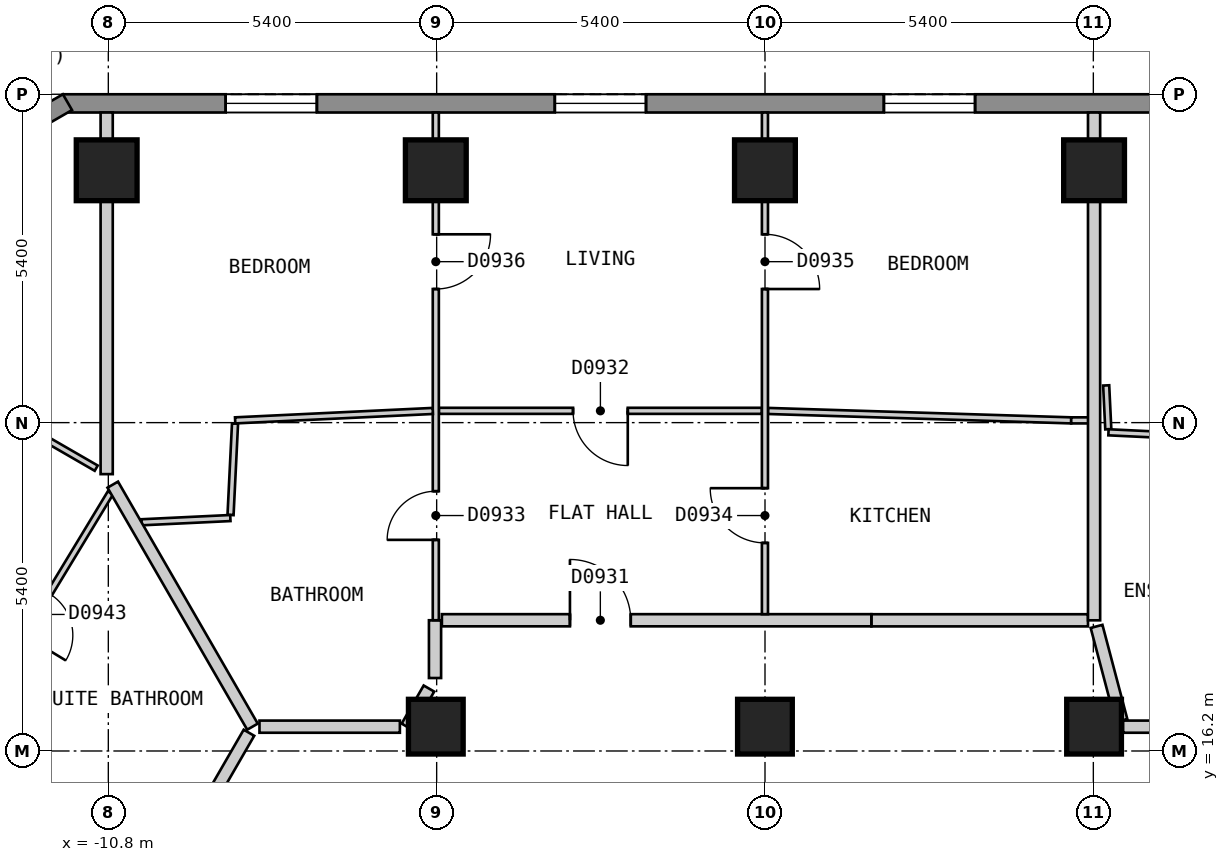
"""IFC4 building model, lengths in metres.
Left out: names, types, materials, properties, quantities, classifications, styles, units other than length and angle.
Written with IfcOpenShell. Run it as: python <this file> out.ifc"""

import sys

from ifc_helpers import new_model, si_unit, direction, frame, frame_2d, origin, origin_2d, place, context, subcontext, project, spatial, polyline, rectangle, outline, extrude, element, fill, save


model = new_model("IFC4")
c1 = context("Model", 3, precision=1e-05, world=origin(), true_north=direction((0.0, 1.0)))
c2 = subcontext(c1, "Body", "Model", "MODEL_VIEW")
j1 = project(units=[si_unit("LENGTHUNIT", "METRE"), si_unit("PLANEANGLEUNIT", "RADIAN")], contexts=[c1])
p1 = place(None, origin())
s1 = spatial("IfcSite", under=j1, at=p1, CompositionType="ELEMENT")
p2 = place(p1, origin())
s2 = spatial("IfcBuilding", under=s1, at=p2, CompositionType="ELEMENT")
p3 = place(p2, frame((0.0, 0.0, 102.0)))
s3 = spatial("IfcBuildingStorey", under=s2, at=p3, CompositionType="ELEMENT", Elevation=102.0)
for number, where, z_axis, x_axis in (
    (1, (5.412, 25.75, 0.0), (0.0, 0.0, 1.0), (-1.0, 0.0, 0.0)),
    (2, (-0.001, 25.75, 0.0), (0.0, 0.0, 1.0), (-1.0, 0.0, 0.0)),
    (3, (-5.414, 25.75, 0.0), (0.0, 0.0, 1.0), (-1.0, 0.0, 0.0)),
    (4, (-10.827, 25.75, 0.0), (0.0, 0.0, 1.0), (-1.0, 0.0, 0.0)),
):
    element("IfcColumn", number, at=place(p3, frame(where, z_axis=z_axis, x_axis=x_axis)), inside=s3, PredefinedType="COLUMN", context=c2, shape_type="SweptSolid", body=[
        extrude(rectangle(XDim=1.0, YDim=1.0, at=origin_2d()), origin(), (0.0, 0.0, 1.0), 3.0),
    ])
for number, where, z_axis, x_axis in (
    (5, (5.412, 16.6, 0.0), (0.0, 0.0, 1.0), (-1.0, 0.0, 0.0)),
    (6, (-0.001, 16.6, 0.0), (0.0, 0.0, 1.0), (-1.0, 0.0, 0.0)),
    (7, (-5.414, 16.6, 0.0), (0.0, 0.0, 1.0), (-1.0, 0.0, 0.0)),
):
    element("IfcColumn", number, at=place(p3, frame(where, z_axis=z_axis, x_axis=x_axis)), inside=s3, PredefinedType="COLUMN", context=c2, shape_type="SweptSolid", body=[
        extrude(rectangle(XDim=0.9, YDim=0.9, at=origin_2d()), origin(), (0.0, 0.0, 1.0), 3.0),
    ])
p4 = place(p3, frame((11.547, 26.85, 0.0), z_axis=(0.0, 0.0, 1.0), x_axis=(-1.0, 0.0, 0.0)))
e8 = element("IfcWall", 8, at=p4, inside=s3, PredefinedType="SOLIDWALL", context=c2, shape_type="SweptSolid", body=[
    extrude(outline(polyline([(0.0, -0.15), (23.094, -0.15), (23.014, 0.15), (0.08, 0.15), (0.0, -0.15)])), origin(), (0.0, 0.0, 1.0), 2.7),
])
p5 = place(p4, frame((2.678, 0.0, 0.15)))
e9 = element("IfcOpeningElement", 9, at=p5, cuts=e8, PredefinedType="OPENING", context=c2, shape_type="SweptSolid", body=[
    extrude(rectangle(XDim=1.5, YDim=2.1, at=frame_2d((0.75, 1.05))), frame((0.0, 0.16, 0.0), z_axis=(0.0, -1.0, 0.0), x_axis=(1.0, 0.0, 0.0)), (0.0, 0.0, 1.0), 0.32),
])
p6 = place(p4, frame((8.092, 0.0, 0.15)))
e10 = element("IfcOpeningElement", 10, at=p6, cuts=e8, PredefinedType="OPENING", context=c2, shape_type="SweptSolid", body=[
    extrude(rectangle(XDim=1.5, YDim=2.1, at=frame_2d((0.75, 1.05))), frame((0.0, 0.16, 0.0), z_axis=(0.0, -1.0, 0.0), x_axis=(1.0, 0.0, 0.0)), (0.0, 0.0, 1.0), 0.32),
])
p7 = place(p4, frame((13.504, 0.0, 0.15)))
e11 = element("IfcOpeningElement", 11, at=p7, cuts=e8, PredefinedType="OPENING", context=c2, shape_type="SweptSolid", body=[
    extrude(rectangle(XDim=1.5, YDim=2.1, at=frame_2d((0.75, 1.05))), frame((0.0, 0.16, 0.0), z_axis=(0.0, -1.0, 0.0), x_axis=(1.0, 0.0, 0.0)), (0.0, 0.0, 1.0), 0.32),
])
p8 = place(p4, frame((18.917, 0.0, 0.15)))
e12 = element("IfcOpeningElement", 12, at=p8, cuts=e8, PredefinedType="OPENING", context=c2, shape_type="SweptSolid", body=[
    extrude(rectangle(XDim=1.5, YDim=2.1, at=frame_2d((0.75, 1.05))), frame((0.0, 0.16, 0.0), z_axis=(0.0, -1.0, 0.0), x_axis=(1.0, 0.0, 0.0)), (0.0, 0.0, 1.0), 0.32),
])
p9 = place(p3, frame((-11.472, 26.87, 0.0), z_axis=(0.0, 0.0, 1.0), x_axis=(-0.866022959057, -0.500004234368, 0.0)))
e13 = element("IfcWall", 13, at=p9, inside=s3, PredefinedType="SOLIDWALL", context=c2, shape_type="SweptSolid", body=[
    extrude(outline(polyline([(0.0, -0.15), (5.0, -0.15), (4.92, 0.15), (0.08, 0.15), (0.0, -0.15)])), origin(), (0.0, 0.0, 1.0), 2.7),
])
p10 = place(p9, frame((0.65, 0.0, 0.15)))
e14 = element("IfcOpeningElement", 14, at=p10, cuts=e13, PredefinedType="OPENING", context=c2, shape_type="SweptSolid", body=[
    extrude(rectangle(XDim=1.2, YDim=2.1, at=frame_2d((0.6, 1.05))), frame((0.0, 0.16, 0.0), z_axis=(0.0, -1.0, 0.0), x_axis=(1.0, 0.0, 0.0)), (0.0, 0.0, 1.0), 0.32),
])
p11 = place(p3, frame((5.453, 18.249, 0.0), z_axis=(0.0, 0.0, 1.0), x_axis=(0.255385747764, -0.966839241983, 0.0)))
e15 = element("IfcWall", 15, at=p11, inside=s3, PredefinedType="PARTITIONING", context=c2, shape_type="SweptSolid", body=[
    extrude(rectangle(XDim=1.602, YDim=0.2, at=frame_2d((0.801, 0.0))), origin(), (0.0, 0.0, 1.0), 2.7),
])
p12 = place(p3, frame((-8.314, 16.6, 0.0), z_axis=(0.0, 0.0, 1.0), x_axis=(1.0, 0.0, 0.0)))
e16 = element("IfcWall", 16, at=p12, inside=s3, PredefinedType="PARTITIONING", context=c2, shape_type="SweptSolid", body=[
    extrude(rectangle(XDim=2.309, YDim=0.2, at=frame_2d((1.155, 0.0))), origin(), (0.0, 0.0, 1.0), 2.7),
])
p13 = place(p3, frame((5.889, 16.6, 0.0), z_axis=(0.0, 0.0, 1.0), x_axis=(1.0, 0.0, 0.0)))
e17 = element("IfcWall", 17, at=p13, inside=s3, PredefinedType="PARTITIONING", context=c2, shape_type="SweptSolid", body=[
    extrude(rectangle(XDim=2.483, YDim=0.2, at=frame_2d((1.242, 0.0))), origin(), (0.0, 0.0, 1.0), 2.7),
])
p14 = place(p3, frame((1.75, 18.349, 0.0), z_axis=(0.0, 0.0, 1.0), x_axis=(1.0, 0.0, 0.0)))
e18 = element("IfcWall", 18, at=p14, inside=s3, PredefinedType="PARTITIONING", context=c2, shape_type="SweptSolid", body=[
    extrude(rectangle(XDim=3.562, YDim=0.2, at=frame_2d((1.781, 0.0))), origin(), (0.0, 0.0, 1.0), 2.7),
])
p15 = place(p3, frame((-5.314, 18.35, 0.0), z_axis=(0.0, 0.0, 1.0), x_axis=(1.0, 0.0, 0.0)))
e19 = element("IfcWall", 19, at=p15, inside=s3, PredefinedType="PARTITIONING", context=c2, shape_type="SweptSolid", body=[
    extrude(rectangle(XDim=7.063, YDim=0.2, at=frame_2d((3.531, 0.0))), origin(), (0.0, 0.0, 1.0), 2.7),
])
p16 = place(p15, frame((2.106, 0.0, 0.0)))
e20 = element("IfcOpeningElement", 20, at=p16, cuts=e19, PredefinedType="OPENING", context=c2, shape_type="SweptSolid", body=[
    extrude(rectangle(XDim=1.0, YDim=2.1, at=frame_2d((0.5, 1.05))), frame((0.0, 0.11, 0.0), z_axis=(0.0, -1.0, 0.0), x_axis=(1.0, 0.0, 0.0)), (0.0, 0.0, 1.0), 0.22),
])
p17 = place(p3, frame((-5.889, 16.6, 0.0), z_axis=(0.0, 0.0, 1.0), x_axis=(0.499839240638, 0.866118198353, 0.0)))
e21 = element("IfcWall", 21, at=p17, inside=s3, PredefinedType="PARTITIONING", context=c2, shape_type="SweptSolid", body=[
    extrude(rectangle(XDim=0.724, YDim=0.2, at=frame_2d((0.362, 0.0))), origin(), (0.0, 0.0, 1.0), 2.7),
])
p18 = place(p3, frame((-18.562, -0.951, 0.0), z_axis=(0.0, 0.0, 1.0), x_axis=(0.499987097491, 0.866032852923, 0.0)))
e22 = element("IfcWall", 22, at=p18, inside=s3, PredefinedType="PARTITIONING", context=c2, shape_type="SweptSolid", body=[
    extrude(rectangle(XDim=20.15, YDim=0.2, at=frame_2d((10.075, 0.0))), origin(), (0.0, 0.0, 1.0), 2.7),
])
p19 = place(p18, frame((14.627, 0.0, 0.0)))
e23 = element("IfcOpeningElement", 23, at=p19, cuts=e22, PredefinedType="OPENING", context=c2, shape_type="SweptSolid", body=[
    extrude(rectangle(XDim=1.0, YDim=2.1, at=frame_2d((0.5, 1.05))), frame((0.0, 0.11, 0.0), z_axis=(0.0, -1.0, 0.0), x_axis=(1.0, 0.0, 0.0)), (0.0, 0.0, 1.0), 0.22),
])
p20 = place(p18, frame((9.604, 0.0, 0.0)))
e24 = element("IfcOpeningElement", 24, at=p20, cuts=e22, PredefinedType="OPENING", context=c2, shape_type="SweptSolid", body=[
    extrude(rectangle(XDim=1.0, YDim=2.1, at=frame_2d((0.5, 1.05))), frame((0.0, 0.11, 0.0), z_axis=(0.0, -1.0, 0.0), x_axis=(1.0, 0.0, 0.0)), (0.0, 0.0, 1.0), 0.22),
])
p21 = place(p3, frame((-5.427, 17.4, 0.0), z_axis=(0.0, 0.0, 1.0), x_axis=(0.0, 1.0, 0.0)))
e25 = element("IfcWall", 25, at=p21, inside=s3, PredefinedType="PARTITIONING", context=c2, shape_type="SweptSolid", body=[
    extrude(rectangle(XDim=0.95, YDim=0.2, at=frame_2d((0.475, 0.0))), origin(), (0.0, 0.0, 1.0), 2.7),
])
p22 = place(p3, frame((5.611, 22.212, 0.0), z_axis=(0.0, 0.0, 1.0), x_axis=(0.048368650834, -0.998829551834, 0.0)))
e26 = element("IfcWall", 26, at=p22, inside=s3, PredefinedType="PARTITIONING", context=c2, shape_type="SweptSolid", body=[
    extrude(rectangle(XDim=0.722, YDim=0.1, at=frame_2d((0.361, 0.0))), origin(), (0.0, 0.0, 1.0), 2.7),
])
p23 = place(p3, frame((0.049, 21.792, 0.0), z_axis=(0.0, 0.0, 1.0), x_axis=(0.999517123417, -0.031072817652, 0.0)))
e27 = element("IfcWall", 27, at=p23, inside=s3, PredefinedType="PARTITIONING", context=c2, shape_type="SweptSolid", body=[
    extrude(rectangle(XDim=4.989, YDim=0.1, at=frame_2d((2.495, 0.0))), origin(), (0.0, 0.0, 1.0), 2.7),
])
p24 = place(p3, frame((5.649, 21.441, 0.0), z_axis=(0.0, 0.0, 1.0), x_axis=(0.998867332207, -0.047582062273, 0.0)))
e28 = element("IfcWall", 28, at=p24, inside=s3, PredefinedType="PARTITIONING", context=c2, shape_type="SweptSolid", body=[
    extrude(rectangle(XDim=2.058, YDim=0.1, at=frame_2d((1.029, 0.0))), origin(), (0.0, 0.0, 1.0), 2.7),
])
p25 = place(p3, frame((-18.489, 19.375, 0.0), z_axis=(0.0, 0.0, 1.0), x_axis=(0.866016855193, -0.500014806302, 0.0)))
e29 = element("IfcWall", 29, at=p25, inside=s3, PredefinedType="PARTITIONING", context=c2, shape_type="SweptSolid", body=[
    extrude(rectangle(XDim=10.0, YDim=0.1, at=frame_2d((5.0, 0.0))), origin(), (0.0, 0.0, 1.0), 2.7),
])
p26 = place(p25, frame((2.577, 0.0, 0.0)))
e30 = element("IfcOpeningElement", 30, at=p26, cuts=e29, PredefinedType="OPENING", context=c2, shape_type="SweptSolid", body=[
    extrude(rectangle(XDim=0.9, YDim=2.1, at=frame_2d((0.45, 1.05))), frame((0.0, 0.06, 0.0), z_axis=(0.0, -1.0, 0.0), x_axis=(1.0, 0.0, 0.0)), (0.0, 0.0, 1.0), 0.12),
])
p27 = place(p3, frame((-15.977, 23.725, 0.0), z_axis=(0.0, 0.0, 1.0), x_axis=(0.866028566888, -0.499994521305, 0.0)))
e31 = element("IfcWall", 31, at=p27, inside=s3, PredefinedType="PARTITIONING", context=c2, shape_type="SweptSolid", body=[
    extrude(rectangle(XDim=5.748, YDim=0.1, at=frame_2d((2.874, 0.0))), origin(), (0.0, 0.0, 1.0), 2.7),
])
p28 = place(p27, frame((2.524, 0.0, 0.0)))
e32 = element("IfcOpeningElement", 32, at=p28, cuts=e31, PredefinedType="OPENING", context=c2, shape_type="SweptSolid", body=[
    extrude(rectangle(XDim=0.9, YDim=2.1, at=frame_2d((0.45, 1.05))), frame((0.0, 0.06, 0.0), z_axis=(0.0, -1.0, 0.0), x_axis=(1.0, 0.0, 0.0)), (0.0, 0.0, 1.0), 0.12),
])
p29 = place(p3, frame((5.036, 21.637, 0.0), z_axis=(0.0, 0.0, 1.0), x_axis=(1.0, 0.0, 0.0)))
e33 = element("IfcWall", 33, at=p29, inside=s3, PredefinedType="PARTITIONING", context=c2, shape_type="SweptSolid", body=[
    extrude(rectangle(XDim=0.337, YDim=0.1, at=frame_2d((0.168, 0.0))), origin(), (0.0, 0.0, 1.0), 2.7),
])
p30 = place(p3, frame((-5.364, 21.794, 0.0), z_axis=(0.0, 0.0, 1.0), x_axis=(1.0, 0.0, 0.0)))
e34 = element("IfcWall", 34, at=p30, inside=s3, PredefinedType="PARTITIONING", context=c2, shape_type="SweptSolid", body=[
    extrude(rectangle(XDim=5.313, YDim=0.1, at=frame_2d((2.656, 0.0))), origin(), (0.0, 0.0, 1.0), 2.7),
])
p31 = place(p30, frame((2.207, 0.0, 0.0)))
e35 = element("IfcOpeningElement", 35, at=p31, cuts=e34, PredefinedType="OPENING", context=c2, shape_type="SweptSolid", body=[
    extrude(rectangle(XDim=0.9, YDim=2.1, at=frame_2d((0.45, 1.05))), frame((0.0, 0.06, 0.0), z_axis=(0.0, -1.0, 0.0), x_axis=(1.0, 0.0, 0.0)), (0.0, 0.0, 1.0), 0.12),
])
p32 = place(p3, frame((-13.221, 16.391, 0.0), z_axis=(0.0, 0.0, 1.0), x_axis=(0.518164725284, 0.855280841286, 0.0)))
e36 = element("IfcWall", 36, at=p32, inside=s3, PredefinedType="PARTITIONING", context=c2, shape_type="SweptSolid", body=[
    extrude(rectangle(XDim=4.74, YDim=0.1, at=frame_2d((2.37, 0.0))), origin(), (0.0, 0.0, 1.0), 2.7),
])
p33 = place(p32, frame((2.002, 0.0, 0.0)))
e37 = element("IfcOpeningElement", 37, at=p33, cuts=e36, PredefinedType="OPENING", context=c2, shape_type="SweptSolid", body=[
    extrude(rectangle(XDim=0.8, YDim=2.1, at=frame_2d((0.4, 1.05))), frame((0.0, 0.06, 0.0), z_axis=(0.0, -1.0, 0.0), x_axis=(1.0, 0.0, 0.0)), (0.0, 0.0, 1.0), 0.12),
])
p34 = place(p3, frame((-8.79, 20.081, 0.0), z_axis=(0.0, 0.0, 1.0), x_axis=(0.049097109821, 0.998794009697, 0.0)))
e38 = element("IfcWall", 38, at=p34, inside=s3, PredefinedType="PARTITIONING", context=c2, shape_type="SweptSolid", body=[
    extrude(rectangle(XDim=1.507, YDim=0.1, at=frame_2d((0.753, 0.0))), origin(), (0.0, 0.0, 1.0), 2.7),
])
p35 = place(p3, frame((-0.001, 18.45, 0.0), z_axis=(0.0, 0.0, 1.0), x_axis=(0.0, 1.0, 0.0)))
e39 = element("IfcWall", 39, at=p35, inside=s3, PredefinedType="PARTITIONING", context=c2, shape_type="SweptSolid", body=[
    extrude(rectangle(XDim=8.25, YDim=0.1, at=frame_2d((4.125, 0.0))), origin(), (0.0, 0.0, 1.0), 2.7),
])
p36 = place(p35, frame((1.172, 0.0, 0.0)))
e40 = element("IfcOpeningElement", 40, at=p36, cuts=e39, PredefinedType="OPENING", context=c2, shape_type="SweptSolid", body=[
    extrude(rectangle(XDim=0.9, YDim=2.1, at=frame_2d((0.45, 1.05))), frame((0.0, 0.06, 0.0), z_axis=(0.0, -1.0, 0.0), x_axis=(1.0, 0.0, 0.0)), (0.0, 0.0, 1.0), 0.12),
])
p37 = place(p35, frame((5.347, 0.0, 0.0)))
e41 = element("IfcOpeningElement", 41, at=p37, cuts=e39, PredefinedType="OPENING", context=c2, shape_type="SweptSolid", body=[
    extrude(rectangle(XDim=0.9, YDim=2.1, at=frame_2d((0.45, 1.05))), frame((0.0, 0.06, 0.0), z_axis=(0.0, -1.0, 0.0), x_axis=(1.0, 0.0, 0.0)), (0.0, 0.0, 1.0), 0.12),
])
p38 = place(p3, frame((-5.414, 18.35, 0.0), z_axis=(0.0, 0.0, 1.0), x_axis=(0.0, 1.0, 0.0)))
e42 = element("IfcWall", 42, at=p38, inside=s3, PredefinedType="PARTITIONING", context=c2, shape_type="SweptSolid", body=[
    extrude(rectangle(XDim=8.35, YDim=0.1, at=frame_2d((4.175, 0.0))), origin(), (0.0, 0.0, 1.0), 2.7),
])
p39 = place(p38, frame((1.322, 0.0, 0.0)))
e43 = element("IfcOpeningElement", 43, at=p39, cuts=e42, PredefinedType="OPENING", context=c2, shape_type="SweptSolid", body=[
    extrude(rectangle(XDim=0.8, YDim=2.1, at=frame_2d((0.4, 1.05))), frame((0.0, 0.06, 0.0), z_axis=(0.0, -1.0, 0.0), x_axis=(1.0, 0.0, 0.0)), (0.0, 0.0, 1.0), 0.12),
])
p40 = place(p38, frame((5.447, 0.0, 0.0)))
e44 = element("IfcOpeningElement", 44, at=p40, cuts=e42, PredefinedType="OPENING", context=c2, shape_type="SweptSolid", body=[
    extrude(rectangle(XDim=0.9, YDim=2.1, at=frame_2d((0.45, 1.05))), frame((0.0, 0.06, 0.0), z_axis=(0.0, -1.0, 0.0), x_axis=(1.0, 0.0, 0.0)), (0.0, 0.0, 1.0), 0.12),
])
p41 = place(p3, frame((-10.254, 19.961, 0.0), z_axis=(0.0, 0.0, 1.0), x_axis=(0.998851840647, 0.047906162812, 0.0)))
e45 = element("IfcWall", 45, at=p41, inside=s3, PredefinedType="PARTITIONING", context=c2, shape_type="SweptSolid", body=[
    extrude(rectangle(XDim=1.463, YDim=0.1, at=frame_2d((0.731, 0.0))), origin(), (0.0, 0.0, 1.0), 2.7),
])
p42 = place(p3, frame((-8.714, 21.637, 0.0), z_axis=(0.0, 0.0, 1.0), x_axis=(0.998864229829, 0.047647144377, 0.0)))
e46 = element("IfcWall", 46, at=p42, inside=s3, PredefinedType="PARTITIONING", context=c2, shape_type="SweptSolid", body=[
    extrude(rectangle(XDim=3.254, YDim=0.1, at=frame_2d((1.627, 0.0))), origin(), (0.0, 0.0, 1.0), 2.7),
])
p43 = place(p3, frame((-10.727, 20.58, 0.0), z_axis=(0.0, 0.0, 1.0), x_axis=(0.500041272028, -0.866001574057, 0.0)))
e47 = element("IfcWall", 47, at=p43, inside=s3, PredefinedType="PARTITIONING", context=c2, shape_type="SweptSolid", body=[
    extrude(rectangle(XDim=4.596, YDim=0.2, at=frame_2d((2.298, 0.0))), origin(), (0.0, 0.0, 1.0), 2.7),
])
p44 = place(p3, frame((5.412, 18.349, 0.0), z_axis=(0.0, 0.0, 1.0), x_axis=(0.0, 1.0, 0.0)))
e48 = element("IfcWall", 48, at=p44, inside=s3, PredefinedType="PARTITIONING", context=c2, shape_type="SweptSolid", body=[
    extrude(rectangle(XDim=8.351, YDim=0.2, at=frame_2d((4.175, 0.0))), origin(), (0.0, 0.0, 1.0), 2.7),
])
p45 = place(p3, frame((-10.827, 20.753, 0.0), z_axis=(0.0, 0.0, 1.0), x_axis=(0.0, 1.0, 0.0)))
e49 = element("IfcWall", 49, at=p45, inside=s3, PredefinedType="PARTITIONING", context=c2, shape_type="SweptSolid", body=[
    extrude(rectangle(XDim=5.947, YDim=0.2, at=frame_2d((2.974, 0.0))), origin(), (0.0, 0.0, 1.0), 2.7),
])
p46 = place(p6, origin())
e50 = element("IfcWindow", 50, at=p46, inside=s3, PartitioningType="SINGLE_PANEL", PredefinedType="WINDOW", context=c2, shape_type="SweptSolid", body=[
    extrude(rectangle(XDim=1.5, YDim=2.1, at=frame_2d((0.75, 1.05))), frame((0.0, 0.03, 0.0), z_axis=(0.0, -1.0, 0.0), x_axis=(1.0, 0.0, 0.0)), (0.0, 0.0, 1.0), 0.06),
])
fill(e10, e50)
p47 = place(p7, origin())
e51 = element("IfcWindow", 51, at=p47, inside=s3, PartitioningType="SINGLE_PANEL", PredefinedType="WINDOW", context=c2, shape_type="SweptSolid", body=[
    extrude(rectangle(XDim=1.5, YDim=2.1, at=frame_2d((0.75, 1.05))), frame((0.0, 0.03, 0.0), z_axis=(0.0, -1.0, 0.0), x_axis=(1.0, 0.0, 0.0)), (0.0, 0.0, 1.0), 0.06),
])
fill(e11, e51)
p48 = place(p8, origin())
e52 = element("IfcWindow", 52, at=p48, inside=s3, PartitioningType="SINGLE_PANEL", PredefinedType="WINDOW", context=c2, shape_type="SweptSolid", body=[
    extrude(rectangle(XDim=1.5, YDim=2.1, at=frame_2d((0.75, 1.05))), frame((0.0, 0.03, 0.0), z_axis=(0.0, -1.0, 0.0), x_axis=(1.0, 0.0, 0.0)), (0.0, 0.0, 1.0), 0.06),
])
fill(e12, e52)
p49 = place(p16, origin())
e53 = element("IfcDoor", 53, at=p49, inside=s3, OperationType="SINGLE_SWING_LEFT", PredefinedType="DOOR", context=c2, shape_type="SweptSolid", body=[
    extrude(rectangle(XDim=1.0, YDim=2.1, at=frame_2d((0.5, 1.05))), frame((0.0, 0.025, 0.0), z_axis=(0.0, -1.0, 0.0), x_axis=(1.0, 0.0, 0.0)), (0.0, 0.0, 1.0), 0.05),
])
fill(e20, e53)
p50 = place(p31, origin())
e54 = element("IfcDoor", 54, at=p50, inside=s3, OperationType="SINGLE_SWING_RIGHT", PredefinedType="DOOR", context=c2, shape_type="SweptSolid", body=[
    extrude(rectangle(XDim=0.9, YDim=2.1, at=frame_2d((0.45, 1.05))), frame((0.0, 0.025, 0.0), z_axis=(0.0, -1.0, 0.0), x_axis=(1.0, 0.0, 0.0)), (0.0, 0.0, 1.0), 0.05),
])
fill(e35, e54)
p51 = place(p39, origin())
e55 = element("IfcDoor", 55, at=p51, inside=s3, OperationType="SINGLE_SWING_LEFT", PredefinedType="DOOR", context=c2, shape_type="SweptSolid", body=[
    extrude(rectangle(XDim=0.8, YDim=2.1, at=frame_2d((0.4, 1.05))), frame((0.0, 0.025, 0.0), z_axis=(0.0, -1.0, 0.0), x_axis=(1.0, 0.0, 0.0)), (0.0, 0.0, 1.0), 0.05),
])
fill(e43, e55)
p52 = place(p36, origin())
e56 = element("IfcDoor", 56, at=p52, inside=s3, OperationType="SINGLE_SWING_RIGHT", PredefinedType="DOOR", context=c2, shape_type="SweptSolid", body=[
    extrude(rectangle(XDim=0.9, YDim=2.1, at=frame_2d((0.45, 1.05))), frame((0.0, 0.025, 0.0), z_axis=(0.0, -1.0, 0.0), x_axis=(1.0, 0.0, 0.0)), (0.0, 0.0, 1.0), 0.05),
])
fill(e40, e56)
p53 = place(p37, origin())
e57 = element("IfcDoor", 57, at=p53, inside=s3, OperationType="SINGLE_SWING_LEFT", PredefinedType="DOOR", context=c2, shape_type="SweptSolid", body=[
    extrude(rectangle(XDim=0.9, YDim=2.1, at=frame_2d((0.45, 1.05))), frame((0.0, 0.025, 0.0), z_axis=(0.0, -1.0, 0.0), x_axis=(1.0, 0.0, 0.0)), (0.0, 0.0, 1.0), 0.05),
])
fill(e41, e57)
p54 = place(p40, origin())
e58 = element("IfcDoor", 58, at=p54, inside=s3, OperationType="SINGLE_SWING_RIGHT", PredefinedType="DOOR", context=c2, shape_type="SweptSolid", body=[
    extrude(rectangle(XDim=0.9, YDim=2.1, at=frame_2d((0.45, 1.05))), frame((0.0, 0.025, 0.0), z_axis=(0.0, -1.0, 0.0), x_axis=(1.0, 0.0, 0.0)), (0.0, 0.0, 1.0), 0.05),
])
fill(e44, e58)
save(model, sys.argv[1])
